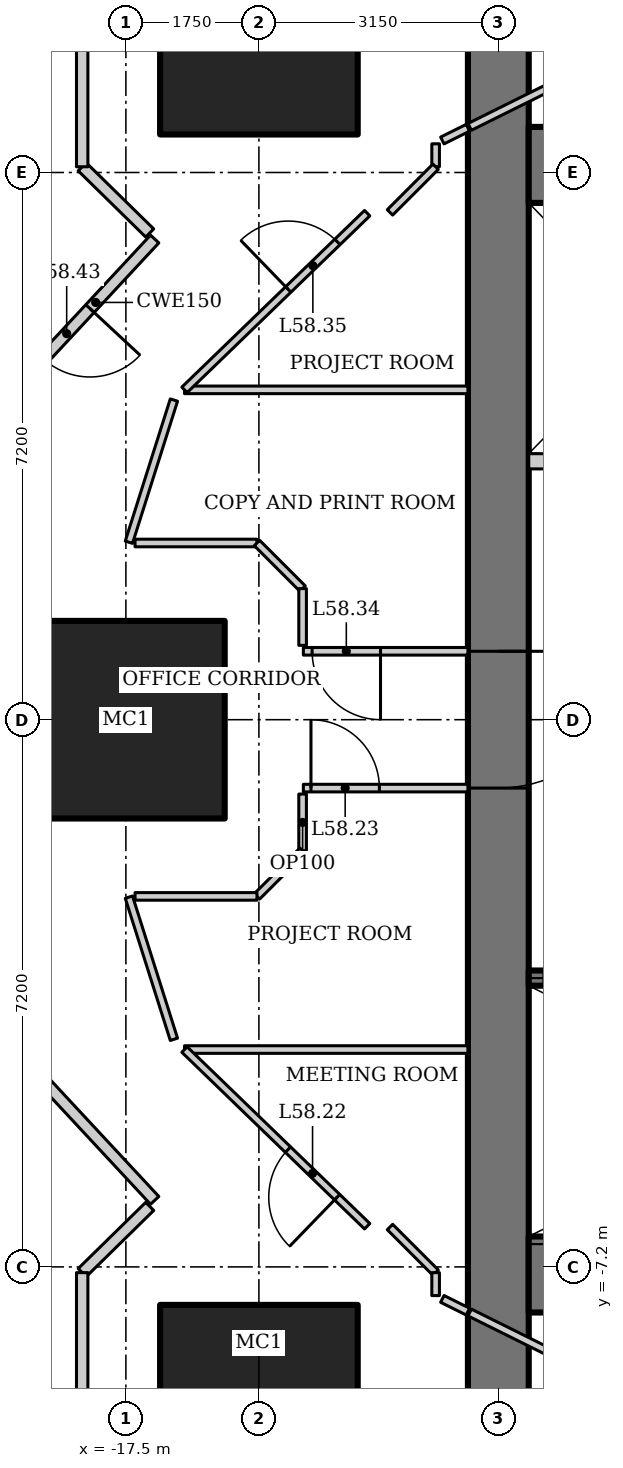
"""IFC4 building model, lengths in metres.
Left out: names, types, materials, properties, quantities, classifications, styles, units other than length and angle.
Written with IfcOpenShell. Run it as: python <this file> out.ifc"""

import sys

from ifc_helpers import new_model, si_unit, direction, frame, frame_2d, origin, origin_2d, place, context, subcontext, project, spatial, rectangle, hollow_rectangle, extrude, element, fill, save


model = new_model("IFC4")
c1 = context("Model", 3, precision=1e-05, world=origin(), true_north=direction((0.0, 1.0)))
c2 = subcontext(c1, "Body", "Model", "MODEL_VIEW")
j1 = project(units=[si_unit("LENGTHUNIT", "METRE"), si_unit("PLANEANGLEUNIT", "RADIAN")], contexts=[c1])
p1 = place(None, origin())
s1 = spatial("IfcSite", under=j1, at=p1, CompositionType="ELEMENT")
p2 = place(p1, origin())
s2 = spatial("IfcBuilding", under=s1, at=p2, CompositionType="ELEMENT")
p3 = place(p2, frame((0.0, 0.0, 249.4)))
s3 = spatial("IfcBuildingStorey", under=s2, at=p3, CompositionType="ELEMENT", Elevation=249.4)
for number, where, z_axis, x_axis in (
    (1, (-15.75, 9.0, 0.0), (0.0, 0.0, 1.0), (1.0, 0.0, 0.0)),
    (2, (-17.5, 0.0, 0.0), (0.0, 0.0, 1.0), (1.0, 0.0, 0.0)),
    (3, (-15.75, -9.0, 0.0), (0.0, 0.0, 1.0), (1.0, 0.0, 0.0)),
):
    element("IfcColumn", number, at=place(p3, frame(where, z_axis=z_axis, x_axis=x_axis)), inside=s3, PredefinedType="COLUMN", context=c2, shape_type="SweptSolid", body=[
        extrude(hollow_rectangle(XDim=2.6, YDim=2.6, WallThickness=0.13, at=origin_2d()), origin(), (0.0, 0.0, 1.0), 4.2),
    ])
p4 = place(p3, frame((-12.6, 11.0, 0.0), z_axis=(0.0, 0.0, 1.0), x_axis=(0.0, -1.0, 0.0)))
e4 = element("IfcWall", 4, at=p4, inside=s3, PredefinedType="SHEAR", context=c2, shape_type="SweptSolid", body=[
    extrude(rectangle(XDim=22.0, YDim=0.8, at=frame_2d((11.0, 0.0))), origin(), (0.0, 0.0, 1.0), 4.2),
])
p5 = place(p4, frame((10.1, 0.0, 0.0)))
e5 = element("IfcOpeningElement", 5, at=p5, cuts=e4, PredefinedType="OPENING", context=c2, shape_type="SweptSolid", body=[
    extrude(rectangle(XDim=1.8, YDim=2.1, at=frame_2d((0.9, 1.05))), frame((0.0, 0.41, 0.0), z_axis=(0.0, -1.0, 0.0), x_axis=(1.0, 0.0, 0.0)), (0.0, 0.0, 1.0), 0.82),
])
p6 = place(p3, frame((-12.2, -7.3, 0.0), z_axis=(0.0, 0.0, 1.0), x_axis=(1.0, 0.0, 0.0)))
e6 = element("IfcWall", 6, at=p6, inside=s3, PredefinedType="SHEAR", context=c2, shape_type="SweptSolid", body=[
    extrude(rectangle(XDim=24.4, YDim=1.0, at=frame_2d((12.2, 0.0))), origin(), (0.0, 0.0, 1.0), 4.2),
])
p7 = place(p3, frame((-5.6, 7.3, 0.0), z_axis=(0.0, 0.0, 1.0), x_axis=(-1.0, 0.0, 0.0)))
e7 = element("IfcWall", 7, at=p7, inside=s3, PredefinedType="SHEAR", context=c2, shape_type="SweptSolid", body=[
    extrude(rectangle(XDim=6.6, YDim=1.0, at=frame_2d((3.3, 0.0))), origin(), (0.0, 0.0, 1.0), 4.2),
])
p8 = place(p3, frame((-5.6, -3.4, 0.0), z_axis=(0.0, 0.0, 1.0), x_axis=(-1.0, 0.0, 0.0)))
e8 = element("IfcWall", 8, at=p8, inside=s3, PredefinedType="SHEAR", context=c2, shape_type="SweptSolid", body=[
    extrude(rectangle(XDim=6.6, YDim=0.2, at=frame_2d((3.3, 0.0))), origin(), (0.0, 0.0, 1.0), 4.2),
])
p9 = place(p8, frame((5.2, 0.0, 0.0)))
e9 = element("IfcOpeningElement", 9, at=p9, cuts=e8, PredefinedType="OPENING", context=c2, shape_type="SweptSolid", body=[
    extrude(rectangle(XDim=1.2, YDim=2.1, at=frame_2d((0.6, 1.05))), frame((0.0, 0.11, 0.0), z_axis=(0.0, -1.0, 0.0), x_axis=(1.0, 0.0, 0.0)), (0.0, 0.0, 1.0), 0.22),
])
p10 = place(p3, frame((-12.2, 3.4, 0.0), z_axis=(0.0, 0.0, 1.0), x_axis=(1.0, 0.0, 0.0)))
e10 = element("IfcWall", 10, at=p10, inside=s3, PredefinedType="SOLIDWALL", context=c2, shape_type="SweptSolid", body=[
    extrude(rectangle(XDim=6.6, YDim=0.2, at=frame_2d((3.3, 0.0))), origin(), (0.0, 0.0, 1.0), 4.2),
])
p11 = place(p10, frame((1.05, 0.0, 0.0)))
e11 = element("IfcOpeningElement", 11, at=p11, cuts=e10, PredefinedType="OPENING", context=c2, shape_type="SweptSolid", body=[
    extrude(rectangle(XDim=1.1, YDim=2.2, at=frame_2d((0.55, 1.1))), frame((0.0, 0.11, 0.0), z_axis=(0.0, -1.0, 0.0), x_axis=(1.0, 0.0, 0.0)), (0.0, 0.0, 1.0), 0.22),
])
p12 = place(p10, frame((4.3, 0.0, 0.0)))
e12 = element("IfcOpeningElement", 12, at=p12, cuts=e10, PredefinedType="OPENING", context=c2, shape_type="SweptSolid", body=[
    extrude(rectangle(XDim=1.4, YDim=2.2, at=frame_2d((0.7, 1.1))), frame((0.0, 0.11, 0.0), z_axis=(0.0, -1.0, 0.0), x_axis=(1.0, 0.0, 0.0)), (0.0, 0.0, 1.0), 0.22),
])
p13 = place(p3, frame((-16.729, -4.34, 0.0), z_axis=(0.0, 0.0, 1.0), x_axis=(1.0, 0.0, 0.0)))
e13 = element("IfcWall", 13, at=p13, inside=s3, PredefinedType="PARTITIONING", context=c2, shape_type="SweptSolid", body=[
    extrude(rectangle(XDim=3.729, YDim=0.1, at=frame_2d((1.865, 0.0))), origin(), (0.0, 0.0, 1.0), 4.05),
])
p14 = place(p3, frame((-13.0, -7.788, 0.0), z_axis=(0.0, 0.0, 1.0), x_axis=(-0.895721570004, 0.444615416995, 0.0)))
e14 = element("IfcWall", 14, at=p14, inside=s3, PredefinedType="PARTITIONING", context=c2, shape_type="SweptSolid", body=[
    extrude(rectangle(XDim=0.376, YDim=0.1, at=frame_2d((0.188, 0.0))), origin(), (0.0, 0.0, 1.0), 4.05),
])
p15 = place(p3, frame((-9.298, -9.628, 0.0), z_axis=(0.0, 0.0, 1.0), x_axis=(-0.895529831139, 0.445001484874, 0.0)))
e15 = element("IfcWall", 15, at=p15, inside=s3, PredefinedType="PARTITIONING", context=c2, shape_type="SweptSolid", body=[
    extrude(rectangle(XDim=4.108, YDim=0.1, at=frame_2d((2.054, 0.0))), origin(), (0.0, 0.0, 1.0), 4.05),
])
p16 = place(p15, frame((1.604, 0.0, 0.0)))
e16 = element("IfcOpeningElement", 16, at=p16, cuts=e15, PredefinedType="OPENING", context=c2, shape_type="SweptSolid", body=[
    extrude(rectangle(XDim=0.9, YDim=2.1, at=frame_2d((0.45, 1.05))), frame((0.0, 0.06, 0.0), z_axis=(0.0, -1.0, 0.0), x_axis=(1.0, 0.0, 0.0)), (0.0, 0.0, 1.0), 0.12),
])
p17 = place(p3, frame((-12.977, 7.8, 0.0), z_axis=(0.0, 0.0, 1.0), x_axis=(0.895529831139, 0.445001484874, 0.0)))
e17 = element("IfcWall", 17, at=p17, inside=s3, PredefinedType="PARTITIONING", context=c2, shape_type="SweptSolid", body=[
    extrude(rectangle(XDim=4.108, YDim=0.1, at=frame_2d((2.054, 0.0))), origin(), (0.0, 0.0, 1.0), 4.05),
])
p18 = place(p17, frame((1.604, 0.0, 0.0)))
e18 = element("IfcOpeningElement", 18, at=p18, cuts=e17, PredefinedType="OPENING", context=c2, shape_type="SweptSolid", body=[
    extrude(rectangle(XDim=0.9, YDim=2.1, at=frame_2d((0.45, 1.05))), frame((0.0, 0.06, 0.0), z_axis=(0.0, -1.0, 0.0), x_axis=(1.0, 0.0, 0.0)), (0.0, 0.0, 1.0), 0.12),
])
p19 = place(p3, frame((-16.729, 4.34, 0.0), z_axis=(0.0, 0.0, 1.0), x_axis=(1.0, 0.0, 0.0)))
e19 = element("IfcWall", 19, at=p19, inside=s3, PredefinedType="PARTITIONING", context=c2, shape_type="SweptSolid", body=[
    extrude(rectangle(XDim=3.729, YDim=0.1, at=frame_2d((1.865, 0.0))), origin(), (0.0, 0.0, 1.0), 4.05),
])
p20 = place(p3, frame((-13.337, 7.621, 0.0), z_axis=(0.0, 0.0, 1.0), x_axis=(0.895721570004, 0.444615416995, 0.0)))
e20 = element("IfcWall", 20, at=p20, inside=s3, PredefinedType="PARTITIONING", context=c2, shape_type="SweptSolid", body=[
    extrude(rectangle(XDim=0.376, YDim=0.1, at=frame_2d((0.188, 0.0))), origin(), (0.0, 0.0, 1.0), 4.05),
])
p21 = place(p3, frame((-16.868, -4.206, 0.0), z_axis=(0.0, 0.0, 1.0), x_axis=(-0.301821975729, 0.953364303384, 0.0)))
e21 = element("IfcWall", 21, at=p21, inside=s3, PredefinedType="PARTITIONING", context=c2, shape_type="SweptSolid", body=[
    extrude(rectangle(XDim=1.962, YDim=0.1, at=frame_2d((0.981, 0.0))), origin(), (0.0, 0.0, 1.0), 4.05),
])
p22 = place(p3, frame((-15.165, -0.9, 0.0), z_axis=(0.0, 0.0, 1.0), x_axis=(1.0, 0.0, 0.0)))
e22 = element("IfcWall", 22, at=p22, inside=s3, PredefinedType="PARTITIONING", context=c2, shape_type="SweptSolid", body=[
    extrude(rectangle(XDim=2.165, YDim=0.1, at=frame_2d((1.083, 0.0))), origin(), (0.0, 0.0, 1.0), 4.05),
])
p23 = place(p22, frame((0.1, 0.0, 0.0)))
e23 = element("IfcOpeningElement", 23, at=p23, cuts=e22, PredefinedType="OPENING", context=c2, shape_type="SweptSolid", body=[
    extrude(rectangle(XDim=0.9, YDim=2.1, at=frame_2d((0.45, 1.05))), frame((0.0, 0.06, 0.0), z_axis=(0.0, -1.0, 0.0), x_axis=(1.0, 0.0, 0.0)), (0.0, 0.0, 1.0), 0.12),
])
p24 = place(p3, frame((-17.46, 2.335, 0.0), z_axis=(0.0, 0.0, 1.0), x_axis=(0.301821975729, 0.953364303384, 0.0)))
e24 = element("IfcWall", 24, at=p24, inside=s3, PredefinedType="PARTITIONING", context=c2, shape_type="SweptSolid", body=[
    extrude(rectangle(XDim=1.962, YDim=0.1, at=frame_2d((0.981, 0.0))), origin(), (0.0, 0.0, 1.0), 4.05),
])
p25 = place(p3, frame((-13.0, 0.9, 0.0), z_axis=(0.0, 0.0, 1.0), x_axis=(-1.0, 0.0, 0.0)))
e25 = element("IfcWall", 25, at=p25, inside=s3, PredefinedType="PARTITIONING", context=c2, shape_type="SweptSolid", body=[
    extrude(rectangle(XDim=2.165, YDim=0.1, at=frame_2d((1.083, 0.0))), origin(), (0.0, 0.0, 1.0), 4.05),
])
p26 = place(p25, frame((1.15, 0.0, 0.0)))
e26 = element("IfcOpeningElement", 26, at=p26, cuts=e25, PredefinedType="OPENING", context=c2, shape_type="SweptSolid", body=[
    extrude(rectangle(XDim=0.9, YDim=2.1, at=frame_2d((0.45, 1.05))), frame((0.0, 0.06, 0.0), z_axis=(0.0, -1.0, 0.0), x_axis=(1.0, 0.0, 0.0)), (0.0, 0.0, 1.0), 0.12),
])
p27 = place(p3, frame((-15.175, -0.978, 0.0), z_axis=(0.0, 0.0, 1.0), x_axis=(0.0, -1.0, 0.0)))
e27 = element("IfcWall", 27, at=p27, inside=s3, PredefinedType="PARTITIONING", context=c2, shape_type="SweptSolid", body=[
    extrude(rectangle(XDim=0.746, YDim=0.1, at=frame_2d((0.373, 0.0))), origin(), (0.0, 0.0, 1.0), 4.05),
])
p28 = place(p3, frame((-15.175, -1.725, 0.0), z_axis=(0.0, 0.0, 1.0), x_axis=(-0.707106781187, -0.707106781187, 0.0)))
e28 = element("IfcWall", 28, at=p28, inside=s3, PredefinedType="PARTITIONING", context=c2, shape_type="SweptSolid", body=[
    extrude(rectangle(XDim=0.849, YDim=0.1, at=frame_2d((0.425, 0.0))), origin(), (0.0, 0.0, 1.0), 4.05),
])
for number, where, z_axis, x_axis in (
    (29, (-15.775, -2.325, 0.0), (0.0, 0.0, 1.0), (-1.0, 0.0, 0.0)),
    (30, (-17.38, 2.325, 0.0), (0.0, 0.0, 1.0), (1.0, 0.0, 0.0)),
):
    element("IfcWall", number, at=place(p3, frame(where, z_axis=z_axis, x_axis=x_axis)), inside=s3, PredefinedType="PARTITIONING", context=c2, shape_type="SweptSolid", body=[
        extrude(rectangle(XDim=1.604, YDim=0.1, at=frame_2d((0.802, 0.0))), origin(), (0.0, 0.0, 1.0), 4.05),
    ])
p29 = place(p3, frame((-15.775, 2.325, 0.0), z_axis=(0.0, 0.0, 1.0), x_axis=(0.707106781187, -0.707106781187, 0.0)))
e31 = element("IfcWall", 31, at=p29, inside=s3, PredefinedType="PARTITIONING", context=c2, shape_type="SweptSolid", body=[
    extrude(rectangle(XDim=0.849, YDim=0.1, at=frame_2d((0.425, 0.0))), origin(), (0.0, 0.0, 1.0), 4.05),
])
p30 = place(p3, frame((-15.175, 1.725, 0.0), z_axis=(0.0, 0.0, 1.0), x_axis=(0.0, -1.0, 0.0)))
e32 = element("IfcWall", 32, at=p30, inside=s3, PredefinedType="PARTITIONING", context=c2, shape_type="SweptSolid", body=[
    extrude(rectangle(XDim=0.746, YDim=0.1, at=frame_2d((0.373, 0.0))), origin(), (0.0, 0.0, 1.0), 4.05),
])
p31 = place(p3, frame((-18.673, -4.656, 0.0), z_axis=(0.0, 0.0, 1.0), x_axis=(0.680985069419, -0.732297299755, 0.0)))
e33 = element("IfcWall", 33, at=p31, inside=s3, PredefinedType="PARTITIONING", context=c2, shape_type="SweptSolid", body=[
    extrude(rectangle(XDim=2.279, YDim=0.15, at=frame_2d((1.14, 0.0))), origin(), (0.0, 0.0, 1.0), 4.05),
])
p32 = place(p3, frame((-14.325, -6.665, 0.0), z_axis=(0.0, 0.0, 1.0), x_axis=(-0.718798647558, 0.695218314107, 0.0)))
e34 = element("IfcWall", 34, at=p32, inside=s3, PredefinedType="PARTITIONING", context=c2, shape_type="SweptSolid", body=[
    extrude(rectangle(XDim=3.344, YDim=0.1, at=frame_2d((1.672, 0.0))), origin(), (0.0, 0.0, 1.0), 4.05),
])
p33 = place(p32, frame((0.55, 0.0, 0.0)))
e35 = element("IfcOpeningElement", 35, at=p33, cuts=e34, PredefinedType="OPENING", context=c2, shape_type="SweptSolid", body=[
    extrude(rectangle(XDim=0.9, YDim=2.1, at=frame_2d((0.45, 1.05))), frame((0.0, 0.06, 0.0), z_axis=(0.0, -1.0, 0.0), x_axis=(1.0, 0.0, 0.0)), (0.0, 0.0, 1.0), 0.12),
])
p34 = place(p3, frame((-14.025, -6.675, 0.0), z_axis=(0.0, 0.0, 1.0), x_axis=(0.707106781187, -0.707106781187, 0.0)))
e36 = element("IfcWall", 36, at=p34, inside=s3, PredefinedType="PARTITIONING", context=c2, shape_type="SweptSolid", body=[
    extrude(rectangle(XDim=0.849, YDim=0.1, at=frame_2d((0.425, 0.0))), origin(), (0.0, 0.0, 1.0), 4.05),
])
p35 = place(p3, frame((-13.425, -7.275, 0.0), z_axis=(0.0, 0.0, 1.0), x_axis=(0.0, -1.0, 0.0)))
e37 = element("IfcWall", 37, at=p35, inside=s3, PredefinedType="PARTITIONING", context=c2, shape_type="SweptSolid", body=[
    extrude(rectangle(XDim=0.302, YDim=0.1, at=frame_2d((0.151, 0.0))), origin(), (0.0, 0.0, 1.0), 4.05),
])
p36 = place(p3, frame((-18.075, -7.275, 0.0), z_axis=(0.0, 0.0, 1.0), x_axis=(0.713842064016, 0.700306723973, 0.0)))
e38 = element("IfcWall", 38, at=p36, inside=s3, PredefinedType="PARTITIONING", context=c2, shape_type="SweptSolid", body=[
    extrude(rectangle(XDim=1.245, YDim=0.15, at=frame_2d((0.622, 0.0))), origin(), (0.0, 0.0, 1.0), 4.05),
])
p37 = place(p3, frame((-18.075, -10.725, 0.0), z_axis=(0.0, 0.0, 1.0), x_axis=(0.0, 1.0, 0.0)))
e39 = element("IfcWall", 39, at=p37, inside=s3, PredefinedType="PARTITIONING", context=c2, shape_type="SweptSolid", body=[
    extrude(rectangle(XDim=3.449, YDim=0.15, at=frame_2d((1.725, 0.0))), origin(), (0.0, 0.0, 1.0), 3.601),
])
p38 = place(p3, frame((-17.121, 6.325, 0.0), z_axis=(0.0, 0.0, 1.0), x_axis=(-0.680985069419, -0.732297299755, 0.0)))
e40 = element("IfcWall", 40, at=p38, inside=s3, PredefinedType="PARTITIONING", context=c2, shape_type="SweptSolid", body=[
    extrude(rectangle(XDim=2.279, YDim=0.15, at=frame_2d((1.14, 0.0))), origin(), (0.0, 0.0, 1.0), 4.05),
])
p39 = place(p38, frame((1.25, 0.0, 0.0)))
e41 = element("IfcOpeningElement", 41, at=p39, cuts=e40, PredefinedType="OPENING", context=c2, shape_type="SweptSolid", body=[
    extrude(rectangle(XDim=0.9, YDim=2.1, at=frame_2d((0.45, 1.05))), frame((0.0, 0.085, 0.0), z_axis=(0.0, -1.0, 0.0), x_axis=(1.0, 0.0, 0.0)), (0.0, 0.0, 1.0), 0.17),
])
p40 = place(p3, frame((-16.729, 4.34, 0.0), z_axis=(0.0, 0.0, 1.0), x_axis=(0.718798647558, 0.695218314107, 0.0)))
e42 = element("IfcWall", 42, at=p40, inside=s3, PredefinedType="PARTITIONING", context=c2, shape_type="SweptSolid", body=[
    extrude(rectangle(XDim=3.344, YDim=0.1, at=frame_2d((1.672, 0.0))), origin(), (0.0, 0.0, 1.0), 4.05),
])
p41 = place(p40, frame((1.9, 0.0, 0.0)))
e43 = element("IfcOpeningElement", 43, at=p41, cuts=e42, PredefinedType="OPENING", context=c2, shape_type="SweptSolid", body=[
    extrude(rectangle(XDim=0.9, YDim=2.1, at=frame_2d((0.45, 1.05))), frame((0.0, 0.06, 0.0), z_axis=(0.0, -1.0, 0.0), x_axis=(1.0, 0.0, 0.0)), (0.0, 0.0, 1.0), 0.12),
])
p42 = place(p3, frame((-13.425, 7.578, 0.0), z_axis=(0.0, 0.0, 1.0), x_axis=(0.0, -1.0, 0.0)))
e44 = element("IfcWall", 44, at=p42, inside=s3, PredefinedType="PARTITIONING", context=c2, shape_type="SweptSolid", body=[
    extrude(rectangle(XDim=0.302, YDim=0.1, at=frame_2d((0.151, 0.0))), origin(), (0.0, 0.0, 1.0), 4.05),
])
p43 = place(p3, frame((-13.425, 7.275, 0.0), z_axis=(0.0, 0.0, 1.0), x_axis=(-0.707106781187, -0.707106781187, 0.0)))
e45 = element("IfcWall", 45, at=p43, inside=s3, PredefinedType="PARTITIONING", context=c2, shape_type="SweptSolid", body=[
    extrude(rectangle(XDim=0.849, YDim=0.1, at=frame_2d((0.425, 0.0))), origin(), (0.0, 0.0, 1.0), 4.05),
])
p44 = place(p3, frame((-17.187, 6.404, 0.0), z_axis=(0.0, 0.0, 1.0), x_axis=(-0.713842064016, 0.700306723973, 0.0)))
e46 = element("IfcWall", 46, at=p44, inside=s3, PredefinedType="PARTITIONING", context=c2, shape_type="SweptSolid", body=[
    extrude(rectangle(XDim=1.245, YDim=0.15, at=frame_2d((0.622, 0.0))), origin(), (0.0, 0.0, 1.0), 4.05),
])
p45 = place(p3, frame((-18.075, 7.275, 0.0), z_axis=(0.0, 0.0, 1.0), x_axis=(0.0, 1.0, 0.0)))
e47 = element("IfcWall", 47, at=p45, inside=s3, PredefinedType="PARTITIONING", context=c2, shape_type="SweptSolid", body=[
    extrude(rectangle(XDim=3.449, YDim=0.15, at=frame_2d((1.725, 0.0))), origin(), (0.0, 0.0, 1.0), 3.601),
])
p46 = place(p9, origin())
e48 = element("IfcDoor", 48, at=p46, inside=s3, OperationType="SINGLE_SWING_RIGHT", PredefinedType="DOOR", context=c2, shape_type="SweptSolid", body=[
    extrude(rectangle(XDim=1.2, YDim=2.1, at=frame_2d((0.6, 1.05))), frame((0.0, 0.025, 0.0), z_axis=(0.0, -1.0, 0.0), x_axis=(1.0, 0.0, 0.0)), (0.0, 0.0, 1.0), 0.05),
])
fill(e9, e48)
p47 = place(p5, origin())
e49 = element("IfcDoor", 49, at=p47, inside=s3, OperationType="DOUBLE_DOOR_DOUBLE_SWING", PredefinedType="DOOR", context=c2, shape_type="SweptSolid", body=[
    extrude(rectangle(XDim=1.8, YDim=2.1, at=frame_2d((0.9, 1.05))), frame((0.0, 0.025, 0.0), z_axis=(0.0, -1.0, 0.0), x_axis=(1.0, 0.0, 0.0)), (0.0, 0.0, 1.0), 0.05),
])
fill(e5, e49)
p48 = place(p33, origin())
e50 = element("IfcDoor", 50, at=p48, inside=s3, OperationType="SINGLE_SWING_LEFT", PredefinedType="DOOR", context=c2, shape_type="SweptSolid", body=[
    extrude(rectangle(XDim=0.9, YDim=2.1, at=frame_2d((0.45, 1.05))), frame((0.0, 0.025, 0.0), z_axis=(0.0, -1.0, 0.0), x_axis=(1.0, 0.0, 0.0)), (0.0, 0.0, 1.0), 0.05),
])
fill(e35, e50)
p49 = place(p23, origin())
e51 = element("IfcDoor", 51, at=p49, inside=s3, OperationType="SINGLE_SWING_LEFT", PredefinedType="DOOR", context=c2, shape_type="SweptSolid", body=[
    extrude(rectangle(XDim=0.9, YDim=2.1, at=frame_2d((0.45, 1.05))), frame((0.0, 0.025, 0.0), z_axis=(0.0, -1.0, 0.0), x_axis=(1.0, 0.0, 0.0)), (0.0, 0.0, 1.0), 0.05),
])
fill(e23, e51)
p50 = place(p26, origin())
e52 = element("IfcDoor", 52, at=p50, inside=s3, OperationType="SINGLE_SWING_LEFT", PredefinedType="DOOR", context=c2, shape_type="SweptSolid", body=[
    extrude(rectangle(XDim=0.9, YDim=2.1, at=frame_2d((0.45, 1.05))), frame((0.0, 0.025, 0.0), z_axis=(0.0, -1.0, 0.0), x_axis=(1.0, 0.0, 0.0)), (0.0, 0.0, 1.0), 0.05),
])
fill(e26, e52)
p51 = place(p41, origin())
e53 = element("IfcDoor", 53, at=p51, inside=s3, OperationType="SINGLE_SWING_LEFT", PredefinedType="DOOR", context=c2, shape_type="SweptSolid", body=[
    extrude(rectangle(XDim=0.9, YDim=2.1, at=frame_2d((0.45, 1.05))), frame((0.0, 0.025, 0.0), z_axis=(0.0, -1.0, 0.0), x_axis=(1.0, 0.0, 0.0)), (0.0, 0.0, 1.0), 0.05),
])
fill(e43, e53)
p52 = place(p39, origin())
e54 = element("IfcDoor", 54, at=p52, inside=s3, OperationType="SINGLE_SWING_LEFT", PredefinedType="DOOR", context=c2, shape_type="SweptSolid", body=[
    extrude(rectangle(XDim=0.9, YDim=2.1, at=frame_2d((0.45, 1.05))), frame((0.0, 0.025, 0.0), z_axis=(0.0, -1.0, 0.0), x_axis=(1.0, 0.0, 0.0)), (0.0, 0.0, 1.0), 0.05),
])
fill(e41, e54)
save(model, sys.argv[1])
